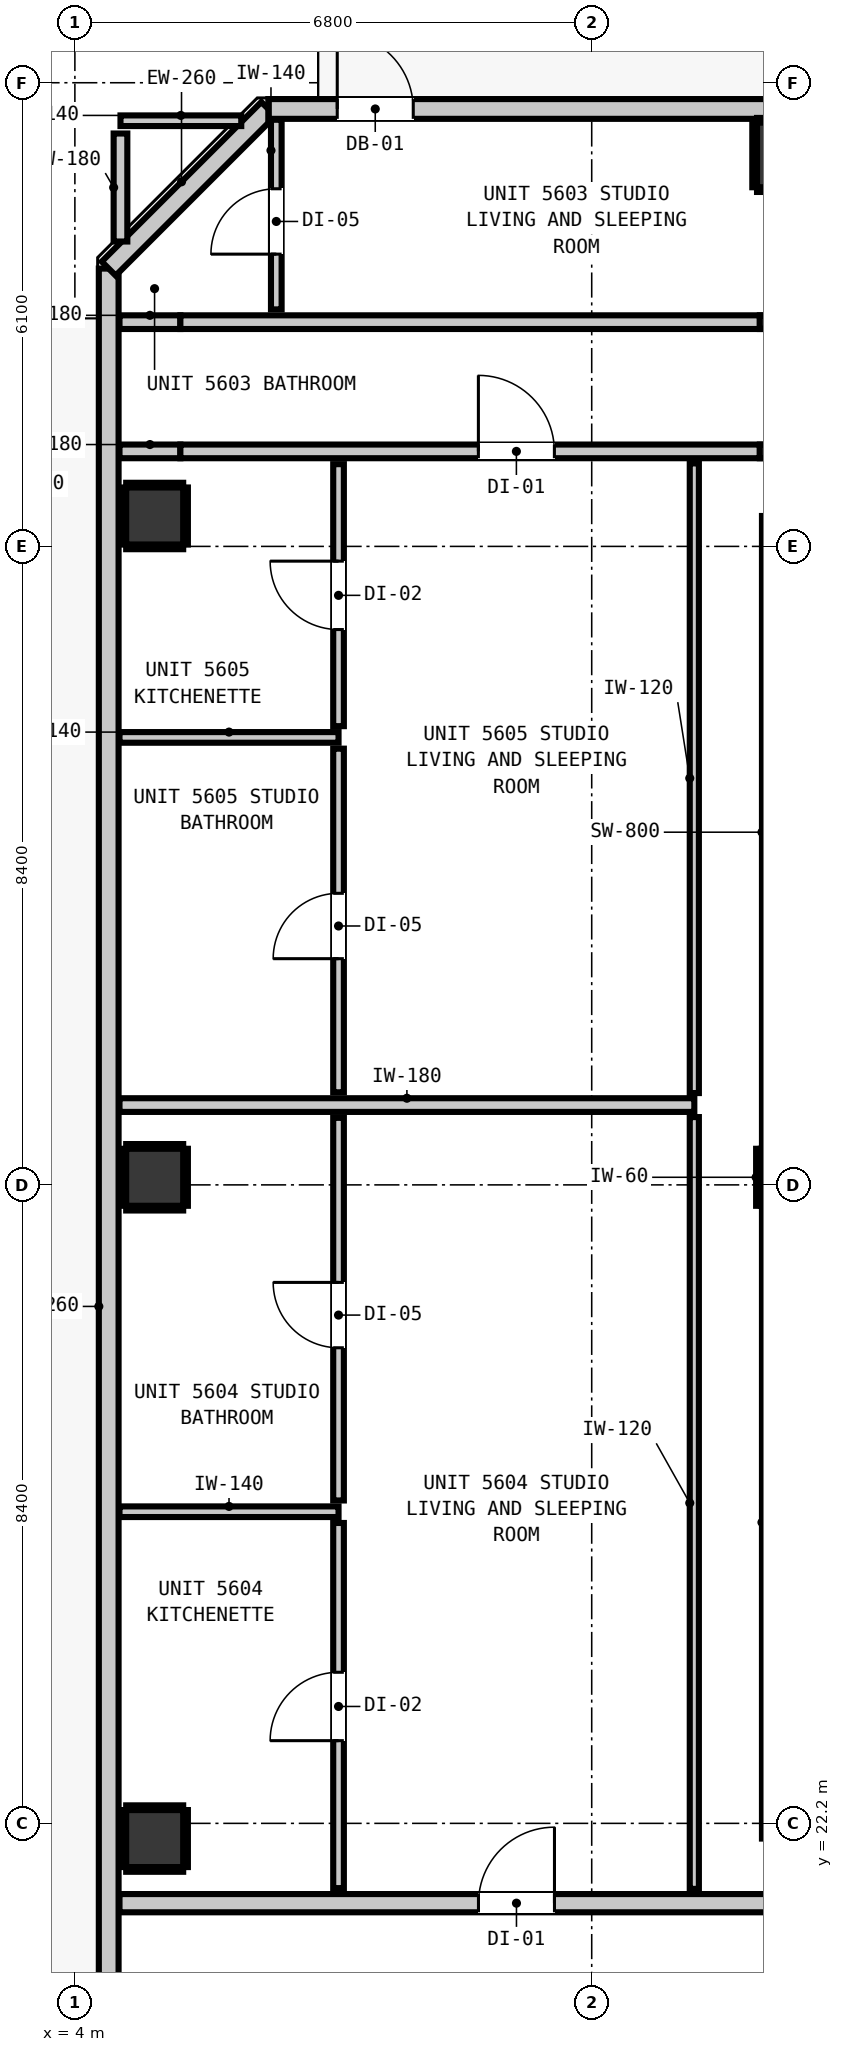
"""IFC4 building model, lengths in metres.
Left out: names, types, materials, properties, quantities, classifications, styles, units other than length and angle.
Written with IfcOpenShell. Run it as: python <this file> out.ifc"""

import sys

from ifc_helpers import new_model, si_unit, direction, frame, frame_2d, origin, origin_2d, place, context, subcontext, project, spatial, rectangle, extrude, element, fill, save


model = new_model("IFC4")
c1 = context("Model", 3, precision=1e-05, world=origin(), true_north=direction((0.0, 1.0)))
c2 = subcontext(c1, "Body", "Model", "MODEL_VIEW")
j1 = project(units=[si_unit("LENGTHUNIT", "METRE"), si_unit("PLANEANGLEUNIT", "RADIAN")], contexts=[c1])
p1 = place(None, origin())
s1 = spatial("IfcSite", under=j1, at=p1, CompositionType="ELEMENT")
p2 = place(p1, origin())
s2 = spatial("IfcBuilding", under=s1, at=p2, CompositionType="ELEMENT")
p3 = place(p2, frame((0.0, 0.0, 193.48)))
s3 = spatial("IfcBuildingStorey", under=s2, at=p3, CompositionType="ELEMENT", Elevation=193.48)
p4 = place(p3, frame((13.4, 30.7, 0.0), z_axis=(0.0, 0.0, 1.0), x_axis=(1.0, 0.0, 0.0)))
e1 = element("IfcColumn", 1, at=p4, inside=s3, PredefinedType="COLUMN", context=c2, shape_type="SweptSolid", body=[
    extrude(rectangle(XDim=0.75, YDim=0.75, at=origin_2d()), origin(), (0.0, 0.0, 1.0), 3.32),
])
p5 = place(p3, frame((13.44, 22.0, 0.0), z_axis=(0.0, 0.0, 1.0), x_axis=(0.0, 1.0, 0.0)))
e2 = element("IfcWall", 2, at=p5, inside=s3, PredefinedType="SHEAR", context=c2, shape_type="SweptSolid", body=[
    extrude(rectangle(XDim=8.32, YDim=0.8, at=frame_2d((4.16, 0.0))), origin(), (0.0, 0.0, 1.0), 3.32),
])
p6 = place(p3, frame((13.44, 31.08, 0.0), z_axis=(0.0, 0.0, 1.0), x_axis=(0.0, 1.0, 0.0)))
e3 = element("IfcWall", 3, at=p6, inside=s3, PredefinedType="SHEAR", context=c2, shape_type="SweptSolid", body=[
    extrude(rectangle(XDim=8.32, YDim=0.8, at=frame_2d((4.16, 0.0))), origin(), (0.0, 0.0, 1.0), 3.32),
])
p7 = place(p3, frame((13.4, 44.15, 0.0), z_axis=(0.0, 0.0, 1.0), x_axis=(1.0, 0.0, 0.0)))
e4 = element("IfcColumn", 4, at=p7, inside=s3, PredefinedType="COLUMN", context=c2, shape_type="SweptSolid", body=[
    extrude(rectangle(XDim=0.85, YDim=0.85, at=origin_2d()), origin(), (0.0, 0.0, 1.0), 3.32),
])
for number, where, z_axis, x_axis in (
    (5, (5.05, 22.0, 0.0), (0.0, 0.0, 1.0), (1.0, 0.0, 0.0)),
    (6, (5.05, 30.7, 0.0), (0.0, 0.0, 1.0), (1.0, 0.0, 0.0)),
    (7, (5.05, 39.4, 0.0), (0.0, 0.0, 1.0), (1.0, 0.0, 0.0)),
):
    element("IfcColumn", number, at=place(p3, frame(where, z_axis=z_axis, x_axis=x_axis)), inside=s3, PredefinedType="COLUMN", context=c2, shape_type="SweptSolid", body=[
        extrude(rectangle(XDim=0.75, YDim=0.75, at=origin_2d()), origin(), (0.0, 0.0, 1.0), 3.32),
    ])
p8 = place(p3, frame((4.445, 12.345, 0.0), z_axis=(0.0, 0.0, 1.0), x_axis=(0.0, 1.0, 0.0)))
e8 = element("IfcWall", 8, at=p8, inside=s3, PredefinedType="STANDARD", context=c2, shape_type="SweptSolid", body=[
    extrude(rectangle(XDim=30.31, YDim=0.26, at=frame_2d((15.155, 0.0))), origin(), (0.0, 0.0, 1.0), 3.1),
])
p9 = place(p8, frame((0.91, 0.0, 0.0)))
e9 = element("IfcOpeningElement", 9, at=p9, cuts=e8, PredefinedType="OPENING", context=c2, shape_type="SweptSolid", body=[
    extrude(rectangle(XDim=1.0, YDim=2.15, at=frame_2d((0.5, 1.075))), frame((0.0, 0.14, 0.0), z_axis=(0.0, -1.0, 0.0), x_axis=(1.0, 0.0, 0.0)), (0.0, 0.0, 1.0), 0.28),
])
p10 = place(p8, frame((2.322, 0.0, 0.85)))
e10 = element("IfcOpeningElement", 10, at=p10, cuts=e8, PredefinedType="OPENING", context=c2, shape_type="SweptSolid", body=[
    extrude(rectangle(XDim=0.58, YDim=1.5, at=frame_2d((0.29, 0.75))), frame((0.0, 0.14, 0.0), z_axis=(0.0, -1.0, 0.0), x_axis=(1.0, 0.0, 0.0)), (0.0, 0.0, 1.0), 0.28),
])
p11 = place(p3, frame((4.445, 42.655, 0.0), z_axis=(0.0, 0.0, 1.0), x_axis=(0.707106781187, 0.707106781187, 0.0)))
e11 = element("IfcWall", 11, at=p11, inside=s3, PredefinedType="STANDARD", context=c2, shape_type="SweptSolid", body=[
    extrude(rectangle(XDim=2.97, YDim=0.26, at=frame_2d((1.485, 0.0))), origin(), (0.0, 0.0, 1.0), 3.1),
])
p12 = place(p3, frame((6.545, 44.755, 0.0), z_axis=(0.0, 0.0, 1.0), x_axis=(1.0, 0.0, 0.0)))
e12 = element("IfcWall", 12, at=p12, inside=s3, PredefinedType="STANDARD", context=c2, shape_type="SweptSolid", body=[
    extrude(rectangle(XDim=32.71, YDim=0.26, at=frame_2d((16.355, 0.0))), origin(), (0.0, 0.0, 1.0), 3.1),
])
p13 = place(p12, frame((0.907, 0.0, 0.0)))
e13 = element("IfcOpeningElement", 13, at=p13, cuts=e12, PredefinedType="OPENING", context=c2, shape_type="SweptSolid", body=[
    extrude(rectangle(XDim=1.0, YDim=2.15, at=frame_2d((0.5, 1.075))), frame((0.0, 0.14, 0.0), z_axis=(0.0, -1.0, 0.0), x_axis=(1.0, 0.0, 0.0)), (0.0, 0.0, 1.0), 0.28),
])
p14 = place(p12, frame((9.88, 0.0, 0.85)))
e14 = element("IfcOpeningElement", 14, at=p14, cuts=e12, PredefinedType="OPENING", context=c2, shape_type="SweptSolid", body=[
    extrude(rectangle(XDim=1.35, YDim=1.85, at=frame_2d((0.675, 0.925))), frame((0.0, 0.14, 0.0), z_axis=(0.0, -1.0, 0.0), x_axis=(1.0, 0.0, 0.0)), (0.0, 0.0, 1.0), 0.28),
])
p15 = place(p12, frame((25.63, 0.0, 0.85)))
e15 = element("IfcOpeningElement", 15, at=p15, cuts=e12, PredefinedType="OPENING", context=c2, shape_type="SweptSolid", body=[
    extrude(rectangle(XDim=1.35, YDim=1.85, at=frame_2d((0.675, 0.925))), frame((0.0, 0.14, 0.0), z_axis=(0.0, -1.0, 0.0), x_axis=(1.0, 0.0, 0.0)), (0.0, 0.0, 1.0), 0.28),
])
p16 = place(p3, frame((4.587, 21.15, 0.0), z_axis=(0.0, 0.0, 1.0), x_axis=(1.0, 0.0, 0.0)))
e16 = element("IfcWall", 16, at=p16, inside=s3, PredefinedType="PARTITIONING", context=c2, shape_type="SweptSolid", body=[
    extrude(rectangle(XDim=36.626, YDim=0.24, at=frame_2d((18.313, 0.0))), origin(), (0.0, 0.0, 1.0), 3.1),
])
p17 = place(p16, frame((13.623, 0.0, 0.0)))
e17 = element("IfcOpeningElement", 17, at=p17, cuts=e16, PredefinedType="OPENING", context=c2, shape_type="SweptSolid", body=[
    extrude(rectangle(XDim=1.1, YDim=2.15, at=frame_2d((0.55, 1.075))), frame((0.0, 0.13, 0.0), z_axis=(0.0, -1.0, 0.0), x_axis=(1.0, 0.0, 0.0)), (0.0, 0.0, 1.0), 0.26),
])
p18 = place(p16, frame((4.723, 0.0, 0.0)))
e18 = element("IfcOpeningElement", 18, at=p18, cuts=e16, PredefinedType="OPENING", context=c2, shape_type="SweptSolid", body=[
    extrude(rectangle(XDim=1.0, YDim=2.15, at=frame_2d((0.5, 1.075))), frame((0.0, 0.13, 0.0), z_axis=(0.0, -1.0, 0.0), x_axis=(1.0, 0.0, 0.0)), (0.0, 0.0, 1.0), 0.26),
])
p19 = place(p3, frame((4.587, 31.65, 0.0), z_axis=(0.0, 0.0, 1.0), x_axis=(1.0, 0.0, 0.0)))
e19 = element("IfcWall", 19, at=p19, inside=s3, PredefinedType="PARTITIONING", context=c2, shape_type="SweptSolid", body=[
    extrude(rectangle(XDim=7.563, YDim=0.18, at=frame_2d((3.781, 0.0))), origin(), (0.0, 0.0, 1.0), 3.1),
])
p20 = place(p3, frame((4.587, 40.25, 0.0), z_axis=(0.0, 0.0, 1.0), x_axis=(1.0, 0.0, 0.0)))
e20 = element("IfcWall", 20, at=p20, inside=s3, PredefinedType="PARTITIONING", context=c2, shape_type="SweptSolid", body=[
    extrude(rectangle(XDim=0.801, YDim=0.18, at=frame_2d((0.4, 0.0))), origin(), (0.0, 0.0, 1.0), 3.1),
])
p21 = place(p3, frame((5.388, 40.25, 0.0), z_axis=(0.0, 0.0, 1.0), x_axis=(1.0, 0.0, 0.0)))
e21 = element("IfcWall", 21, at=p21, inside=s3, PredefinedType="PARTITIONING", context=c2, shape_type="SweptSolid", body=[
    extrude(rectangle(XDim=7.624, YDim=0.18, at=frame_2d((3.812, 0.0))), origin(), (0.0, 0.0, 1.0), 2.477),
])
p22 = place(p21, frame((3.921, 0.0, 0.0)))
e22 = element("IfcOpeningElement", 22, at=p22, cuts=e21, PredefinedType="OPENING", context=c2, shape_type="SweptSolid", body=[
    extrude(rectangle(XDim=1.0, YDim=2.15, at=frame_2d((0.5, 1.075))), frame((0.0, 0.1, 0.0), z_axis=(0.0, -1.0, 0.0), x_axis=(1.0, 0.0, 0.0)), (0.0, 0.0, 1.0), 0.2),
])
p23 = place(p3, frame((13.012, 40.25, 0.0), z_axis=(0.0, 0.0, 1.0), x_axis=(1.0, 0.0, 0.0)))
e23 = element("IfcWall", 23, at=p23, inside=s3, PredefinedType="PARTITIONING", context=c2, shape_type="SweptSolid", body=[
    extrude(rectangle(XDim=28.201, YDim=0.18, at=frame_2d((14.101, 0.0))), origin(), (0.0, 0.0, 1.0), 3.1),
])
p24 = place(p23, frame((4.423, 0.0, 0.0)))
e24 = element("IfcOpeningElement", 24, at=p24, cuts=e23, PredefinedType="OPENING", context=c2, shape_type="SweptSolid", body=[
    extrude(rectangle(XDim=1.4, YDim=2.15, at=frame_2d((0.7, 1.075))), frame((0.0, 0.1, 0.0), z_axis=(0.0, -1.0, 0.0), x_axis=(1.0, 0.0, 0.0)), (0.0, 0.0, 1.0), 0.2),
])
p25 = place(p3, frame((4.587, 41.95, 0.0), z_axis=(0.0, 0.0, 1.0), x_axis=(1.0, 0.0, 0.0)))
e25 = element("IfcWall", 25, at=p25, inside=s3, PredefinedType="PARTITIONING", context=c2, shape_type="SweptSolid", body=[
    extrude(rectangle(XDim=0.801, YDim=0.18, at=frame_2d((0.4, 0.0))), origin(), (0.0, 0.0, 1.0), 3.1),
])
p26 = place(p3, frame((5.388, 41.95, 0.0), z_axis=(0.0, 0.0, 1.0), x_axis=(1.0, 0.0, 0.0)))
e26 = element("IfcWall", 26, at=p26, inside=s3, PredefinedType="PARTITIONING", context=c2, shape_type="SweptSolid", body=[
    extrude(rectangle(XDim=7.624, YDim=0.18, at=frame_2d((3.812, 0.0))), origin(), (0.0, 0.0, 1.0), 2.477),
])
p27 = place(p3, frame((13.012, 41.95, 0.0), z_axis=(0.0, 0.0, 1.0), x_axis=(1.0, 0.0, 0.0)))
e27 = element("IfcWall", 27, at=p27, inside=s3, PredefinedType="PARTITIONING", context=c2, shape_type="SweptSolid", body=[
    extrude(rectangle(XDim=28.201, YDim=0.18, at=frame_2d((14.101, 0.0))), origin(), (0.0, 0.0, 1.0), 3.1),
])
p28 = place(p27, frame((1.003, 0.0, 0.0)))
e28 = element("IfcOpeningElement", 28, at=p28, cuts=e27, PredefinedType="OPENING", context=c2, shape_type="SweptSolid", body=[
    extrude(rectangle(XDim=1.0, YDim=2.15, at=frame_2d((0.5, 1.075))), frame((0.0, 0.1, 0.0), z_axis=(0.0, -1.0, 0.0), x_axis=(1.0, 0.0, 0.0)), (0.0, 0.0, 1.0), 0.2),
])
p29 = place(p27, frame((19.224, 0.0, 0.0)))
e29 = element("IfcOpeningElement", 29, at=p29, cuts=e27, PredefinedType="OPENING", context=c2, shape_type="SweptSolid", body=[
    extrude(rectangle(XDim=0.9, YDim=2.1, at=frame_2d((0.45, 1.05))), frame((0.0, 0.1, 0.0), z_axis=(0.0, -1.0, 0.0), x_axis=(1.0, 0.0, 0.0)), (0.0, 0.0, 1.0), 0.2),
])
for number, where, z_axis, x_axis in (
    (30, (4.587, 26.3, 0.0), (0.0, 0.0, 1.0), (1.0, 0.0, 0.0)),
    (31, (4.587, 36.487, 0.0), (0.0, 0.0, 1.0), (1.0, 0.0, 0.0)),
):
    element("IfcWall", number, at=place(p3, frame(where, z_axis=z_axis, x_axis=x_axis)), inside=s3, PredefinedType="PARTITIONING", context=c2, shape_type="SweptSolid", body=[
        extrude(rectangle(XDim=2.882, YDim=0.14, at=frame_2d((1.441, 0.0))), origin(), (0.0, 0.0, 1.0), 3.1),
    ])
p30 = place(p3, frame((4.6, 44.6, 0.0), z_axis=(0.0, 0.0, 1.0), x_axis=(1.0, 0.0, 0.0)))
e32 = element("IfcWall", 32, at=p30, inside=s3, PredefinedType="PARTITIONING", context=c2, shape_type="SweptSolid", body=[
    extrude(rectangle(XDim=1.589, YDim=0.14, at=frame_2d((0.794, 0.0))), origin(), (0.0, 0.0, 1.0), 3.1),
])
p31 = place(p3, frame((4.6, 43.011, 0.0), z_axis=(0.0, 0.0, 1.0), x_axis=(0.0, 1.0, 0.0)))
e33 = element("IfcWall", 33, at=p31, inside=s3, PredefinedType="PARTITIONING", context=c2, shape_type="SweptSolid", body=[
    extrude(rectangle(XDim=1.421, YDim=0.18, at=frame_2d((0.71, 0.0))), origin(), (0.0, 0.0, 1.0), 3.1),
])
p32 = place(p3, frame((6.65, 42.118, 0.0), z_axis=(0.0, 0.0, 1.0), x_axis=(0.0, 1.0, 0.0)))
e34 = element("IfcWall", 34, at=p32, inside=s3, PredefinedType="PARTITIONING", context=c2, shape_type="SweptSolid", body=[
    extrude(rectangle(XDim=2.495, YDim=0.14, at=frame_2d((1.248, 0.0))), origin(), (0.0, 0.0, 1.0), 3.1),
])
p33 = place(p32, frame((0.727, 0.0, 0.0)))
e35 = element("IfcOpeningElement", 35, at=p33, cuts=e34, PredefinedType="OPENING", context=c2, shape_type="SweptSolid", body=[
    extrude(rectangle(XDim=0.86, YDim=2.02, at=frame_2d((0.43, 1.01))), frame((0.0, 0.08, 0.0), z_axis=(0.0, -1.0, 0.0), x_axis=(1.0, 0.0, 0.0)), (0.0, 0.0, 1.0), 0.16),
])
p34 = place(p3, frame((7.469, 21.348, 0.0), z_axis=(0.0, 0.0, 1.0), x_axis=(0.0, 1.0, 0.0)))
e36 = element("IfcWall", 36, at=p34, inside=s3, PredefinedType="PARTITIONING", context=c2, shape_type="SweptSolid", body=[
    extrude(rectangle(XDim=4.804, YDim=0.14, at=frame_2d((2.402, 0.0))), origin(), (0.0, 0.0, 1.0), 3.1),
])
p35 = place(p34, frame((1.94, 0.0, 0.0)))
e37 = element("IfcOpeningElement", 37, at=p35, cuts=e36, PredefinedType="OPENING", context=c2, shape_type="SweptSolid", body=[
    extrude(rectangle(XDim=0.9, YDim=2.1, at=frame_2d((0.45, 1.05))), frame((0.0, 0.08, 0.0), z_axis=(0.0, -1.0, 0.0), x_axis=(1.0, 0.0, 0.0)), (0.0, 0.0, 1.0), 0.16),
])
p36 = place(p3, frame((7.469, 26.448, 0.0), z_axis=(0.0, 0.0, 1.0), x_axis=(0.0, 1.0, 0.0)))
e38 = element("IfcWall", 38, at=p36, inside=s3, PredefinedType="PARTITIONING", context=c2, shape_type="SweptSolid", body=[
    extrude(rectangle(XDim=5.034, YDim=0.14, at=frame_2d((2.517, 0.0))), origin(), (0.0, 0.0, 1.0), 3.1),
])
p37 = place(p36, frame((2.009, 0.0, 0.0)))
e39 = element("IfcOpeningElement", 39, at=p37, cuts=e38, PredefinedType="OPENING", context=c2, shape_type="SweptSolid", body=[
    extrude(rectangle(XDim=0.86, YDim=2.02, at=frame_2d((0.43, 1.01))), frame((0.0, 0.08, 0.0), z_axis=(0.0, -1.0, 0.0), x_axis=(1.0, 0.0, 0.0)), (0.0, 0.0, 1.0), 0.16),
])
p38 = place(p3, frame((7.469, 31.818, 0.0), z_axis=(0.0, 0.0, 1.0), x_axis=(0.0, 1.0, 0.0)))
e40 = element("IfcWall", 40, at=p38, inside=s3, PredefinedType="PARTITIONING", context=c2, shape_type="SweptSolid", body=[
    extrude(rectangle(XDim=4.521, YDim=0.14, at=frame_2d((2.26, 0.0))), origin(), (0.0, 0.0, 1.0), 3.1),
])
p39 = place(p38, frame((1.758, 0.0, 0.0)))
e41 = element("IfcOpeningElement", 41, at=p39, cuts=e40, PredefinedType="OPENING", context=c2, shape_type="SweptSolid", body=[
    extrude(rectangle(XDim=0.86, YDim=2.02, at=frame_2d((0.43, 1.01))), frame((0.0, 0.08, 0.0), z_axis=(0.0, -1.0, 0.0), x_axis=(1.0, 0.0, 0.0)), (0.0, 0.0, 1.0), 0.16),
])
p40 = place(p3, frame((7.469, 36.635, 0.0), z_axis=(0.0, 0.0, 1.0), x_axis=(0.0, 1.0, 0.0)))
e42 = element("IfcWall", 42, at=p40, inside=s3, PredefinedType="PARTITIONING", context=c2, shape_type="SweptSolid", body=[
    extrude(rectangle(XDim=3.447, YDim=0.14, at=frame_2d((1.724, 0.0))), origin(), (0.0, 0.0, 1.0), 3.1),
])
p41 = place(p40, frame((1.271, 0.0, 0.0)))
e43 = element("IfcOpeningElement", 43, at=p41, cuts=e42, PredefinedType="OPENING", context=c2, shape_type="SweptSolid", body=[
    extrude(rectangle(XDim=0.9, YDim=2.1, at=frame_2d((0.45, 1.05))), frame((0.0, 0.08, 0.0), z_axis=(0.0, -1.0, 0.0), x_axis=(1.0, 0.0, 0.0)), (0.0, 0.0, 1.0), 0.16),
])
p42 = place(p3, frame((12.15, 21.338, 0.0), z_axis=(0.0, 0.0, 1.0), x_axis=(0.0, 1.0, 0.0)))
e44 = element("IfcWall", 44, at=p42, inside=s3, PredefinedType="PARTITIONING", context=c2, shape_type="SweptSolid", body=[
    extrude(rectangle(XDim=10.154, YDim=0.12, at=frame_2d((5.077, 0.0))), origin(), (0.0, 0.0, 1.0), 3.1),
])
p43 = place(p3, frame((12.15, 31.808, 0.0), z_axis=(0.0, 0.0, 1.0), x_axis=(0.0, 1.0, 0.0)))
e45 = element("IfcWall", 45, at=p43, inside=s3, PredefinedType="PARTITIONING", context=c2, shape_type="SweptSolid", body=[
    extrude(rectangle(XDim=8.284, YDim=0.12, at=frame_2d((4.142, 0.0))), origin(), (0.0, 0.0, 1.0), 3.1),
])
p44 = place(p3, frame((12.993, 30.325, 0.0), z_axis=(0.0, 0.0, 1.0), x_axis=(0.0, 1.0, 0.0)))
e46 = element("IfcWall", 46, at=p44, inside=s3, PredefinedType="PARTITIONING", context=c2, shape_type="SweptSolid", body=[
    extrude(rectangle(XDim=0.75, YDim=0.06, at=frame_2d((0.375, 0.0))), origin(), (0.0, 0.0, 1.0), 1.45),
])
for number, where, z_axis, x_axis in (
    (47, (12.975, 43.693, 0.0), (0.0, 0.0, 1.0), (1.0, 0.0, 0.0)),
    (48, (12.975, 44.607, 0.0), (0.0, 0.0, 1.0), (1.0, 0.0, 0.0)),
    (49, (12.943, 43.725, 0.0), (0.0, 0.0, 1.0), (0.0, 1.0, 0.0)),
):
    element("IfcWall", number, at=place(p3, frame(where, z_axis=z_axis, x_axis=x_axis)), inside=s3, PredefinedType="PARTITIONING", context=c2, shape_type="SweptSolid", body=[
        extrude(rectangle(XDim=0.85, YDim=0.06, at=frame_2d((0.425, 0.0))), origin(), (0.0, 0.0, 1.0), 1.45),
    ])
for number, where, z_axis, x_axis in (
    (50, (4.675, 21.593, 0.0), (0.0, 0.0, 1.0), (1.0, 0.0, 0.0)),
    (51, (4.675, 22.407, 0.0), (0.0, 0.0, 1.0), (1.0, 0.0, 0.0)),
    (52, (4.643, 21.625, 0.0), (0.0, 0.0, 1.0), (0.0, 1.0, 0.0)),
    (53, (5.457, 21.625, 0.0), (0.0, 0.0, 1.0), (0.0, 1.0, 0.0)),
    (54, (4.675, 30.293, 0.0), (0.0, 0.0, 1.0), (1.0, 0.0, 0.0)),
    (55, (4.675, 31.107, 0.0), (0.0, 0.0, 1.0), (1.0, 0.0, 0.0)),
    (56, (4.643, 30.325, 0.0), (0.0, 0.0, 1.0), (0.0, 1.0, 0.0)),
    (57, (5.457, 30.325, 0.0), (0.0, 0.0, 1.0), (0.0, 1.0, 0.0)),
    (58, (4.675, 38.993, 0.0), (0.0, 0.0, 1.0), (1.0, 0.0, 0.0)),
    (59, (4.675, 39.807, 0.0), (0.0, 0.0, 1.0), (1.0, 0.0, 0.0)),
    (60, (4.643, 39.025, 0.0), (0.0, 0.0, 1.0), (0.0, 1.0, 0.0)),
    (61, (5.457, 39.025, 0.0), (0.0, 0.0, 1.0), (0.0, 1.0, 0.0)),
):
    element("IfcWall", number, at=place(p3, frame(where, z_axis=z_axis, x_axis=x_axis)), inside=s3, PredefinedType="PARTITIONING", context=c2, shape_type="SweptSolid", body=[
        extrude(rectangle(XDim=0.75, YDim=0.06, at=frame_2d((0.375, 0.0))), origin(), (0.0, 0.0, 1.0), 1.45),
    ])
p45 = place(p13, origin())
e62 = element("IfcDoor", 62, at=p45, inside=s3, OperationType="SINGLE_SWING_LEFT", PredefinedType="DOOR", context=c2, shape_type="SweptSolid", body=[
    extrude(rectangle(XDim=1.0, YDim=2.15, at=frame_2d((0.5, 1.075))), frame((0.0, 0.025, 0.0), z_axis=(0.0, -1.0, 0.0), x_axis=(1.0, 0.0, 0.0)), (0.0, 0.0, 1.0), 0.05),
])
fill(e13, e62)
p46 = place(p33, origin())
e63 = element("IfcDoor", 63, at=p46, inside=s3, OperationType="SINGLE_SWING_LEFT", PredefinedType="DOOR", context=c2, shape_type="SweptSolid", body=[
    extrude(rectangle(XDim=0.86, YDim=2.02, at=frame_2d((0.43, 1.01))), frame((0.0, 0.025, 0.0), z_axis=(0.0, -1.0, 0.0), x_axis=(1.0, 0.0, 0.0)), (0.0, 0.0, 1.0), 0.05),
])
fill(e35, e63)
p47 = place(p18, origin())
e64 = element("IfcDoor", 64, at=p47, inside=s3, OperationType="SINGLE_SWING_RIGHT", PredefinedType="DOOR", context=c2, shape_type="SweptSolid", body=[
    extrude(rectangle(XDim=1.0, YDim=2.15, at=frame_2d((0.5, 1.075))), frame((0.0, 0.025, 0.0), z_axis=(0.0, -1.0, 0.0), x_axis=(1.0, 0.0, 0.0)), (0.0, 0.0, 1.0), 0.05),
])
fill(e18, e64)
p48 = place(p35, origin())
e65 = element("IfcDoor", 65, at=p48, inside=s3, OperationType="SINGLE_SWING_LEFT", PredefinedType="DOOR", context=c2, shape_type="SweptSolid", body=[
    extrude(rectangle(XDim=0.9, YDim=2.1, at=frame_2d((0.45, 1.05))), frame((0.0, 0.025, 0.0), z_axis=(0.0, -1.0, 0.0), x_axis=(1.0, 0.0, 0.0)), (0.0, 0.0, 1.0), 0.05),
])
fill(e37, e65)
p49 = place(p37, origin())
e66 = element("IfcDoor", 66, at=p49, inside=s3, OperationType="SINGLE_SWING_RIGHT", PredefinedType="DOOR", context=c2, shape_type="SweptSolid", body=[
    extrude(rectangle(XDim=0.86, YDim=2.02, at=frame_2d((0.43, 1.01))), frame((0.0, 0.025, 0.0), z_axis=(0.0, -1.0, 0.0), x_axis=(1.0, 0.0, 0.0)), (0.0, 0.0, 1.0), 0.05),
])
fill(e39, e66)
p50 = place(p22, origin())
e67 = element("IfcDoor", 67, at=p50, inside=s3, OperationType="SINGLE_SWING_LEFT", PredefinedType="DOOR", context=c2, shape_type="SweptSolid", body=[
    extrude(rectangle(XDim=1.0, YDim=2.15, at=frame_2d((0.5, 1.075))), frame((0.0, 0.025, 0.0), z_axis=(0.0, -1.0, 0.0), x_axis=(1.0, 0.0, 0.0)), (0.0, 0.0, 1.0), 0.05),
])
fill(e22, e67)
p51 = place(p41, origin())
e68 = element("IfcDoor", 68, at=p51, inside=s3, OperationType="SINGLE_SWING_RIGHT", PredefinedType="DOOR", context=c2, shape_type="SweptSolid", body=[
    extrude(rectangle(XDim=0.9, YDim=2.1, at=frame_2d((0.45, 1.05))), frame((0.0, 0.025, 0.0), z_axis=(0.0, -1.0, 0.0), x_axis=(1.0, 0.0, 0.0)), (0.0, 0.0, 1.0), 0.05),
])
fill(e43, e68)
p52 = place(p39, origin())
e69 = element("IfcDoor", 69, at=p52, inside=s3, OperationType="SINGLE_SWING_LEFT", PredefinedType="DOOR", context=c2, shape_type="SweptSolid", body=[
    extrude(rectangle(XDim=0.86, YDim=2.02, at=frame_2d((0.43, 1.01))), frame((0.0, 0.025, 0.0), z_axis=(0.0, -1.0, 0.0), x_axis=(1.0, 0.0, 0.0)), (0.0, 0.0, 1.0), 0.05),
])
fill(e41, e69)
save(model, sys.argv[1])
